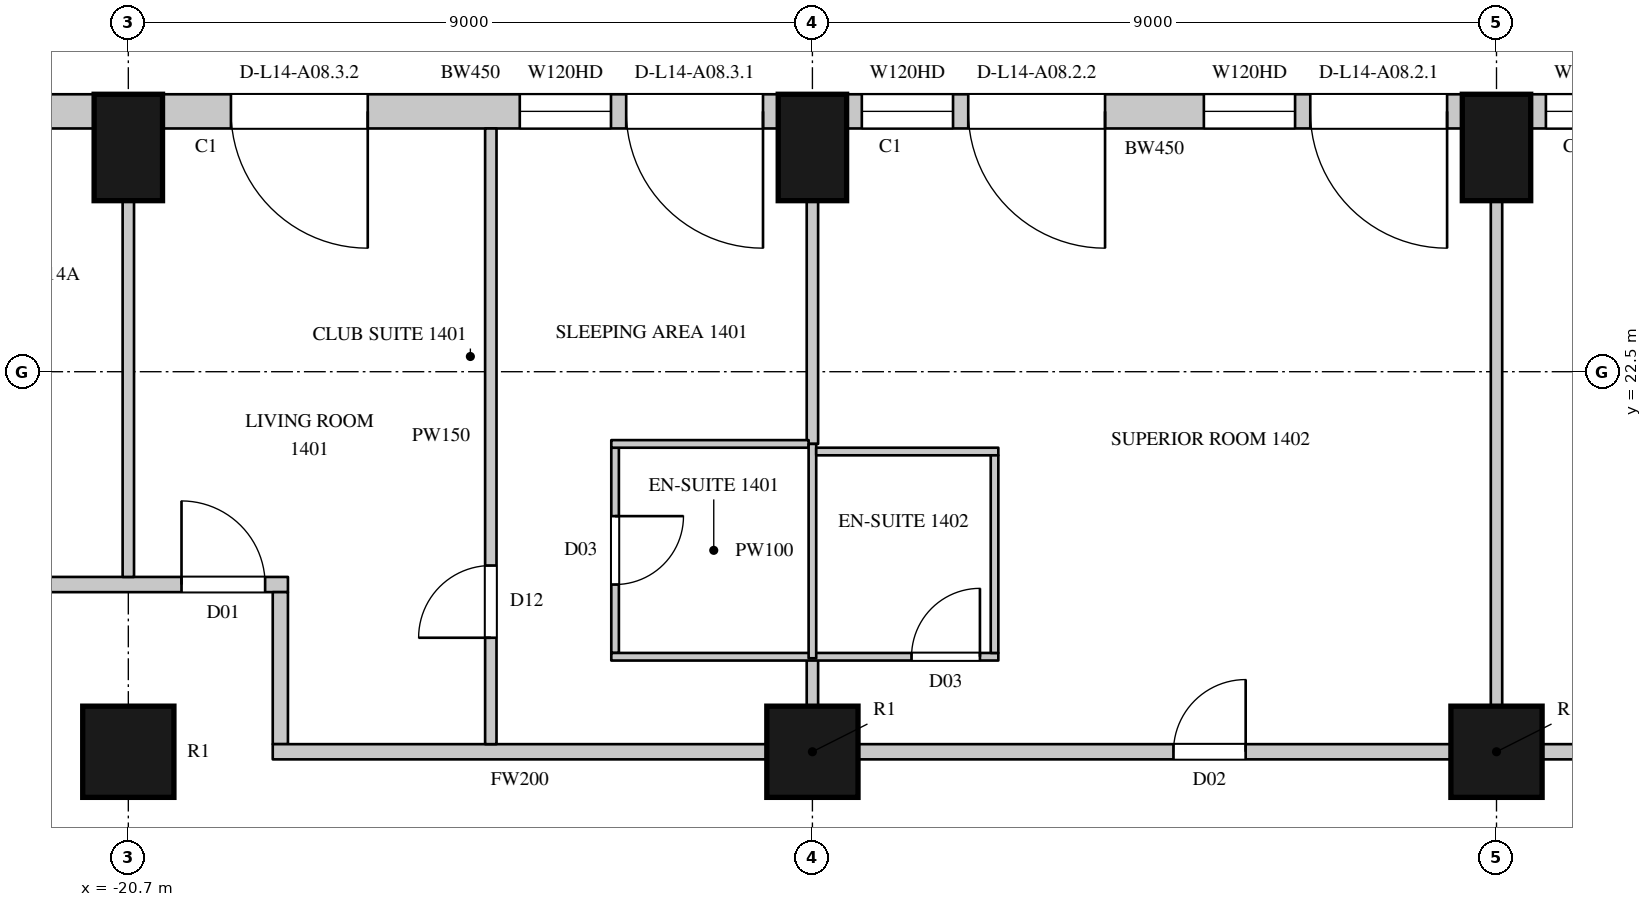
"""IFC4 building model, lengths in metres.
Left out: names, types, materials, properties, quantities, classifications, styles, units other than length and angle.
Written with IfcOpenShell. Run it as: python <this file> out.ifc"""

import sys

from ifc_helpers import new_model, si_unit, direction, frame, frame_2d, origin, origin_2d, place, context, subcontext, project, spatial, rectangle, circle, extrude, element, fill, save


model = new_model("IFC4")
c1 = context("Model", 3, precision=1e-05, world=origin(), true_north=direction((0.0, 1.0)))
c2 = subcontext(c1, "Body", "Model", "MODEL_VIEW")
j1 = project(units=[si_unit("LENGTHUNIT", "METRE"), si_unit("PLANEANGLEUNIT", "RADIAN")], contexts=[c1])
p1 = place(None, origin())
s1 = spatial("IfcSite", under=j1, at=p1, CompositionType="ELEMENT")
p2 = place(p1, origin())
s2 = spatial("IfcBuilding", under=s1, at=p2, CompositionType="ELEMENT")
p3 = place(p2, frame((0.0, 0.0, 80.7)))
s3 = spatial("IfcBuildingStorey", under=s2, at=p3, CompositionType="ELEMENT", Elevation=80.7)
for number, where, z_axis, x_axis in (
    (1, (-2.7, 25.45, 0.0), (0.0, 0.0, 1.0), (-1.0, 0.0, 0.0)),
    (2, (-11.7, 25.45, 0.0), (0.0, 0.0, 1.0), (-1.0, 0.0, 0.0)),
    (3, (-20.7, 25.45, 0.0), (0.0, 0.0, 1.0), (-1.0, 0.0, 0.0)),
):
    element("IfcColumn", number, at=place(p3, frame(where, z_axis=z_axis, x_axis=x_axis)), inside=s3, PredefinedType="COLUMN", context=c2, shape_type="SweptSolid", body=[
        extrude(rectangle(XDim=0.9, YDim=1.4, at=origin_2d()), origin(), (0.0, 0.0, 1.0), 3.6),
    ])
for number, where, z_axis, x_axis in (
    (4, (-20.7, 17.5, 0.0), (0.0, 0.0, 1.0), (1.0, 0.0, 0.0)),
    (5, (-11.7, 17.5, 0.0), (0.0, 0.0, 1.0), (1.0, 0.0, 0.0)),
    (6, (-2.7, 17.5, 0.0), (0.0, 0.0, 1.0), (1.0, 0.0, 0.0)),
):
    element("IfcColumn", number, at=place(p3, frame(where, z_axis=z_axis, x_axis=x_axis)), inside=s3, PredefinedType="COLUMN", context=c2, shape_type="SweptSolid", body=[
        extrude(circle(Radius=0.6, at=origin_2d()), origin(), (0.0, 0.0, 1.0), 3.6),
    ])
p4 = place(p3, frame((5.85, 25.925, 0.0), z_axis=(0.0, 0.0, 1.0), x_axis=(-1.0, 0.0, 0.0)))
e7 = element("IfcWall", 7, at=p4, inside=s3, PredefinedType="SOLIDWALL", context=c2, shape_type="SweptSolid", body=[
    extrude(rectangle(XDim=8.1, YDim=0.45, at=frame_2d((4.05, 0.0))), origin(), (0.0, 0.0, 1.0), 3.3),
])
p5 = place(p4, frame((0.2, 0.0, 0.0)))
e8 = element("IfcOpeningElement", 8, at=p5, cuts=e7, PredefinedType="OPENING", context=c2, shape_type="SweptSolid", body=[
    extrude(rectangle(XDim=1.8, YDim=2.4, at=frame_2d((0.9, 1.2))), frame((0.0, 0.235, 0.0), z_axis=(0.0, -1.0, 0.0), x_axis=(1.0, 0.0, 0.0)), (0.0, 0.0, 1.0), 0.47),
])
p6 = place(p4, frame((2.2, 0.0, 1.05)))
e9 = element("IfcOpeningElement", 9, at=p6, cuts=e7, PredefinedType="OPENING", context=c2, shape_type="SweptSolid", body=[
    extrude(rectangle(XDim=1.2, YDim=2.0, at=frame_2d((0.6, 1.0))), frame((0.0, 0.235, 0.0), z_axis=(0.0, -1.0, 0.0), x_axis=(1.0, 0.0, 0.0)), (0.0, 0.0, 1.0), 0.47),
])
p7 = place(p4, frame((4.7, 0.0, 0.0)))
e10 = element("IfcOpeningElement", 10, at=p7, cuts=e7, PredefinedType="OPENING", context=c2, shape_type="SweptSolid", body=[
    extrude(rectangle(XDim=1.8, YDim=2.4, at=frame_2d((0.9, 1.2))), frame((0.0, 0.235, 0.0), z_axis=(0.0, -1.0, 0.0), x_axis=(1.0, 0.0, 0.0)), (0.0, 0.0, 1.0), 0.47),
])
p8 = place(p4, frame((6.7, 0.0, 1.05)))
e11 = element("IfcOpeningElement", 11, at=p8, cuts=e7, PredefinedType="OPENING", context=c2, shape_type="SweptSolid", body=[
    extrude(rectangle(XDim=1.2, YDim=2.0, at=frame_2d((0.6, 1.0))), frame((0.0, 0.235, 0.0), z_axis=(0.0, -1.0, 0.0), x_axis=(1.0, 0.0, 0.0)), (0.0, 0.0, 1.0), 0.47),
])
p9 = place(p3, frame((-3.15, 25.925, 0.0), z_axis=(0.0, 0.0, 1.0), x_axis=(-1.0, 0.0, 0.0)))
e12 = element("IfcWall", 12, at=p9, inside=s3, PredefinedType="SOLIDWALL", context=c2, shape_type="SweptSolid", body=[
    extrude(rectangle(XDim=8.1, YDim=0.45, at=frame_2d((4.05, 0.0))), origin(), (0.0, 0.0, 1.0), 3.3),
])
p10 = place(p9, frame((0.2, 0.0, 0.0)))
e13 = element("IfcOpeningElement", 13, at=p10, cuts=e12, PredefinedType="OPENING", context=c2, shape_type="SweptSolid", body=[
    extrude(rectangle(XDim=1.8, YDim=2.4, at=frame_2d((0.9, 1.2))), frame((0.0, 0.235, 0.0), z_axis=(0.0, -1.0, 0.0), x_axis=(1.0, 0.0, 0.0)), (0.0, 0.0, 1.0), 0.47),
])
p11 = place(p9, frame((2.2, 0.0, 1.05)))
e14 = element("IfcOpeningElement", 14, at=p11, cuts=e12, PredefinedType="OPENING", context=c2, shape_type="SweptSolid", body=[
    extrude(rectangle(XDim=1.2, YDim=2.0, at=frame_2d((0.6, 1.0))), frame((0.0, 0.235, 0.0), z_axis=(0.0, -1.0, 0.0), x_axis=(1.0, 0.0, 0.0)), (0.0, 0.0, 1.0), 0.47),
])
p12 = place(p9, frame((4.7, 0.0, 0.0)))
e15 = element("IfcOpeningElement", 15, at=p12, cuts=e12, PredefinedType="OPENING", context=c2, shape_type="SweptSolid", body=[
    extrude(rectangle(XDim=1.8, YDim=2.4, at=frame_2d((0.9, 1.2))), frame((0.0, 0.235, 0.0), z_axis=(0.0, -1.0, 0.0), x_axis=(1.0, 0.0, 0.0)), (0.0, 0.0, 1.0), 0.47),
])
p13 = place(p9, frame((6.7, 0.0, 1.05)))
e16 = element("IfcOpeningElement", 16, at=p13, cuts=e12, PredefinedType="OPENING", context=c2, shape_type="SweptSolid", body=[
    extrude(rectangle(XDim=1.2, YDim=2.0, at=frame_2d((0.6, 1.0))), frame((0.0, 0.235, 0.0), z_axis=(0.0, -1.0, 0.0), x_axis=(1.0, 0.0, 0.0)), (0.0, 0.0, 1.0), 0.47),
])
p14 = place(p3, frame((-12.15, 25.925, 0.0), z_axis=(0.0, 0.0, 1.0), x_axis=(-1.0, 0.0, 0.0)))
e17 = element("IfcWall", 17, at=p14, inside=s3, PredefinedType="SOLIDWALL", context=c2, shape_type="SweptSolid", body=[
    extrude(rectangle(XDim=8.1, YDim=0.45, at=frame_2d((4.05, 0.0))), origin(), (0.0, 0.0, 1.0), 3.3),
])
p15 = place(p14, frame((0.2, 0.0, 0.0)))
e18 = element("IfcOpeningElement", 18, at=p15, cuts=e17, PredefinedType="OPENING", context=c2, shape_type="SweptSolid", body=[
    extrude(rectangle(XDim=1.8, YDim=2.4, at=frame_2d((0.9, 1.2))), frame((0.0, 0.235, 0.0), z_axis=(0.0, -1.0, 0.0), x_axis=(1.0, 0.0, 0.0)), (0.0, 0.0, 1.0), 0.47),
])
p16 = place(p14, frame((2.2, 0.0, 1.05)))
e19 = element("IfcOpeningElement", 19, at=p16, cuts=e17, PredefinedType="OPENING", context=c2, shape_type="SweptSolid", body=[
    extrude(rectangle(XDim=1.2, YDim=2.0, at=frame_2d((0.6, 1.0))), frame((0.0, 0.235, 0.0), z_axis=(0.0, -1.0, 0.0), x_axis=(1.0, 0.0, 0.0)), (0.0, 0.0, 1.0), 0.47),
])
p17 = place(p14, frame((5.4, 0.0, 0.0)))
e20 = element("IfcOpeningElement", 20, at=p17, cuts=e17, PredefinedType="OPENING", context=c2, shape_type="SweptSolid", body=[
    extrude(rectangle(XDim=1.8, YDim=2.4, at=frame_2d((0.9, 1.2))), frame((0.0, 0.235, 0.0), z_axis=(0.0, -1.0, 0.0), x_axis=(1.0, 0.0, 0.0)), (0.0, 0.0, 1.0), 0.47),
])
p18 = place(p3, frame((-21.15, 25.925, 0.0), z_axis=(0.0, 0.0, 1.0), x_axis=(-1.0, 0.0, 0.0)))
e21 = element("IfcWall", 21, at=p18, inside=s3, PredefinedType="SOLIDWALL", context=c2, shape_type="SweptSolid", body=[
    extrude(rectangle(XDim=2.914, YDim=0.45, at=frame_2d((1.457, 0.0))), origin(), (0.0, 0.0, 1.0), 3.3),
])
p19 = place(p3, frame((-23.7, 19.7, 0.0), z_axis=(0.0, 0.0, 1.0), x_axis=(1.0, 0.0, 0.0)))
e22 = element("IfcWall", 22, at=p19, inside=s3, PredefinedType="PARTITIONING", context=c2, shape_type="SweptSolid", body=[
    extrude(rectangle(XDim=5.1, YDim=0.2, at=frame_2d((2.55, 0.0))), origin(), (0.0, 0.0, 1.0), 3.3),
])
p20 = place(p19, frame((0.8, 0.0, 0.0)))
e23 = element("IfcOpeningElement", 23, at=p20, cuts=e22, PredefinedType="OPENING", context=c2, shape_type="SweptSolid", body=[
    extrude(rectangle(XDim=0.9, YDim=2.2, at=frame_2d((0.45, 1.1))), frame((0.0, 0.11, 0.0), z_axis=(0.0, -1.0, 0.0), x_axis=(1.0, 0.0, 0.0)), (0.0, 0.0, 1.0), 0.22),
])
p21 = place(p19, frame((3.7, 0.0, 0.0)))
e24 = element("IfcOpeningElement", 24, at=p21, cuts=e22, PredefinedType="OPENING", context=c2, shape_type="SweptSolid", body=[
    extrude(rectangle(XDim=1.1, YDim=2.4, at=frame_2d((0.55, 1.2))), frame((0.0, 0.11, 0.0), z_axis=(0.0, -1.0, 0.0), x_axis=(1.0, 0.0, 0.0)), (0.0, 0.0, 1.0), 0.22),
])
p22 = place(p3, frame((-18.7, 17.6, 0.0), z_axis=(0.0, 0.0, 1.0), x_axis=(0.0, 1.0, 0.0)))
e25 = element("IfcWall", 25, at=p22, inside=s3, PredefinedType="PARTITIONING", context=c2, shape_type="SweptSolid", body=[
    extrude(rectangle(XDim=2.0, YDim=0.2, at=frame_2d((1.0, 0.0))), origin(), (0.0, 0.0, 1.0), 3.3),
])
p23 = place(p3, frame((-18.8, 17.5, 0.0), z_axis=(0.0, 0.0, 1.0), x_axis=(1.0, 0.0, 0.0)))
e26 = element("IfcWall", 26, at=p23, inside=s3, PredefinedType="PARTITIONING", context=c2, shape_type="SweptSolid", body=[
    extrude(rectangle(XDim=6.5, YDim=0.2, at=frame_2d((3.25, 0.0))), origin(), (0.0, 0.0, 1.0), 2.75),
])
p24 = place(p3, frame((-11.1, 17.5, 0.0), z_axis=(0.0, 0.0, 1.0), x_axis=(1.0, 0.0, 0.0)))
e27 = element("IfcWall", 27, at=p24, inside=s3, PredefinedType="PARTITIONING", context=c2, shape_type="SweptSolid", body=[
    extrude(rectangle(XDim=7.8, YDim=0.2, at=frame_2d((3.9, 0.0))), origin(), (0.0, 0.0, 1.0), 2.75),
])
p25 = place(p24, frame((4.15, 0.0, 0.0)))
e28 = element("IfcOpeningElement", 28, at=p25, cuts=e27, PredefinedType="OPENING", context=c2, shape_type="SweptSolid", body=[
    extrude(rectangle(XDim=0.95, YDim=2.2, at=frame_2d((0.475, 1.1))), frame((0.0, 0.11, 0.0), z_axis=(0.0, -1.0, 0.0), x_axis=(1.0, 0.0, 0.0)), (0.0, 0.0, 1.0), 0.22),
])
p26 = place(p3, frame((-2.1, 17.5, 0.0), z_axis=(0.0, 0.0, 1.0), x_axis=(1.0, 0.0, 0.0)))
e29 = element("IfcWall", 29, at=p26, inside=s3, PredefinedType="PARTITIONING", context=c2, shape_type="SweptSolid", body=[
    extrude(rectangle(XDim=7.8, YDim=0.2, at=frame_2d((3.9, 0.0))), origin(), (0.0, 0.0, 1.0), 2.75),
])
p27 = place(p26, frame((1.55, 0.0, 0.0)))
e30 = element("IfcOpeningElement", 30, at=p27, cuts=e29, PredefinedType="OPENING", context=c2, shape_type="SweptSolid", body=[
    extrude(rectangle(XDim=1.1, YDim=2.4, at=frame_2d((0.55, 1.2))), frame((0.0, 0.11, 0.0), z_axis=(0.0, -1.0, 0.0), x_axis=(1.0, 0.0, 0.0)), (0.0, 0.0, 1.0), 0.22),
])
p28 = place(p3, frame((-20.7, 19.8, 0.0), z_axis=(0.0, 0.0, 1.0), x_axis=(0.0, 1.0, 0.0)))
e31 = element("IfcWall", 31, at=p28, inside=s3, PredefinedType="PARTITIONING", context=c2, shape_type="SweptSolid", body=[
    extrude(rectangle(XDim=4.95, YDim=0.15, at=frame_2d((2.475, 0.0))), origin(), (0.0, 0.0, 1.0), 2.75),
])
p29 = place(p3, frame((-15.931, 17.6, 0.0), z_axis=(0.0, 0.0, 1.0), x_axis=(0.0, 1.0, 0.0)))
e32 = element("IfcWall", 32, at=p29, inside=s3, PredefinedType="PARTITIONING", context=c2, shape_type="SweptSolid", body=[
    extrude(rectangle(XDim=8.1, YDim=0.15, at=frame_2d((4.05, 0.0))), origin(), (0.0, 0.0, 1.0), 3.3),
])
p30 = place(p29, frame((1.4, 0.0, 0.0)))
e33 = element("IfcOpeningElement", 33, at=p30, cuts=e32, PredefinedType="OPENING", context=c2, shape_type="SweptSolid", body=[
    extrude(rectangle(XDim=0.95, YDim=2.2, at=frame_2d((0.475, 1.1))), frame((0.0, 0.085, 0.0), z_axis=(0.0, -1.0, 0.0), x_axis=(1.0, 0.0, 0.0)), (0.0, 0.0, 1.0), 0.17),
])
p31 = place(p3, frame((-11.7, 18.1, 0.0), z_axis=(0.0, 0.0, 1.0), x_axis=(0.0, 1.0, 0.0)))
e34 = element("IfcWall", 34, at=p31, inside=s3, PredefinedType="PARTITIONING", context=c2, shape_type="SweptSolid", body=[
    extrude(rectangle(XDim=0.63, YDim=0.15, at=frame_2d((0.315, 0.0))), origin(), (0.0, 0.0, 1.0), 2.75),
])
p32 = place(p3, frame((-11.7, 21.55, 0.0), z_axis=(0.0, 0.0, 1.0), x_axis=(0.0, 1.0, 0.0)))
e35 = element("IfcWall", 35, at=p32, inside=s3, PredefinedType="PARTITIONING", context=c2, shape_type="SweptSolid", body=[
    extrude(rectangle(XDim=3.2, YDim=0.15, at=frame_2d((1.6, 0.0))), origin(), (0.0, 0.0, 1.0), 2.75),
])
p33 = place(p3, frame((-2.7, 18.1, 0.0), z_axis=(0.0, 0.0, 1.0), x_axis=(0.0, 1.0, 0.0)))
e36 = element("IfcWall", 36, at=p33, inside=s3, PredefinedType="PARTITIONING", context=c2, shape_type="SweptSolid", body=[
    extrude(rectangle(XDim=6.65, YDim=0.15, at=frame_2d((3.325, 0.0))), origin(), (0.0, 0.0, 1.0), 2.75),
])
p34 = place(p3, frame((-14.296, 18.8, 0.0), z_axis=(0.0, 0.0, 1.0), x_axis=(0.0, 1.0, 0.0)))
e37 = element("IfcWall", 37, at=p34, inside=s3, PredefinedType="PARTITIONING", context=c2, shape_type="SweptSolid", body=[
    extrude(rectangle(XDim=2.7, YDim=0.1, at=frame_2d((1.35, 0.0))), origin(), (0.0, 0.0, 1.0), 3.3),
])
p35 = place(p34, frame((0.9, 0.0, 0.0)))
e38 = element("IfcOpeningElement", 38, at=p35, cuts=e37, PredefinedType="OPENING", context=c2, shape_type="SweptSolid", body=[
    extrude(rectangle(XDim=0.9, YDim=2.2, at=frame_2d((0.45, 1.1))), frame((0.0, 0.06, 0.0), z_axis=(0.0, -1.0, 0.0), x_axis=(1.0, 0.0, 0.0)), (0.0, 0.0, 1.0), 0.12),
])
p36 = place(p3, frame((-14.346, 18.75, 0.0), z_axis=(0.0, 0.0, 1.0), x_axis=(1.0, 0.0, 0.0)))
e39 = element("IfcWall", 39, at=p36, inside=s3, PredefinedType="PARTITIONING", context=c2, shape_type="SweptSolid", body=[
    extrude(rectangle(XDim=5.092, YDim=0.1, at=frame_2d((2.546, 0.0))), origin(), (0.0, 0.0, 1.0), 3.3),
])
p37 = place(p36, frame((3.95, 0.0, 0.0)))
e40 = element("IfcOpeningElement", 40, at=p37, cuts=e39, PredefinedType="OPENING", context=c2, shape_type="SweptSolid", body=[
    extrude(rectangle(XDim=0.9, YDim=2.2, at=frame_2d((0.45, 1.1))), frame((0.0, 0.06, 0.0), z_axis=(0.0, -1.0, 0.0), x_axis=(1.0, 0.0, 0.0)), (0.0, 0.0, 1.0), 0.12),
])
p38 = place(p3, frame((-14.346, 21.55, 0.0), z_axis=(0.0, 0.0, 1.0), x_axis=(1.0, 0.0, 0.0)))
e41 = element("IfcWall", 41, at=p38, inside=s3, PredefinedType="PARTITIONING", context=c2, shape_type="SweptSolid", body=[
    extrude(rectangle(XDim=2.596, YDim=0.1, at=frame_2d((1.298, 0.0))), origin(), (0.0, 0.0, 1.0), 3.3),
])
p39 = place(p3, frame((-11.7, 18.73, 0.0), z_axis=(0.0, 0.0, 1.0), x_axis=(0.0, 1.0, 0.0)))
e42 = element("IfcWall", 42, at=p39, inside=s3, PredefinedType="PARTITIONING", context=c2, shape_type="SweptSolid", body=[
    extrude(rectangle(XDim=2.82, YDim=0.1, at=frame_2d((1.41, 0.0))), origin(), (0.0, 0.0, 1.0), 2.75),
])
p40 = place(p3, frame((-11.65, 21.45, 0.0), z_axis=(0.0, 0.0, 1.0), x_axis=(1.0, 0.0, 0.0)))
e43 = element("IfcWall", 43, at=p40, inside=s3, PredefinedType="PARTITIONING", context=c2, shape_type="SweptSolid", body=[
    extrude(rectangle(XDim=2.396, YDim=0.1, at=frame_2d((1.198, 0.0))), origin(), (0.0, 0.0, 1.0), 3.3),
])
p41 = place(p3, frame((-9.304, 18.8, 0.0), z_axis=(0.0, 0.0, 1.0), x_axis=(0.0, 1.0, 0.0)))
e44 = element("IfcWall", 44, at=p41, inside=s3, PredefinedType="PARTITIONING", context=c2, shape_type="SweptSolid", body=[
    extrude(rectangle(XDim=2.6, YDim=0.1, at=frame_2d((1.3, 0.0))), origin(), (0.0, 0.0, 1.0), 3.3),
])
p42 = place(p8, origin())
e45 = element("IfcWindow", 45, at=p42, inside=s3, PartitioningType="SINGLE_PANEL", PredefinedType="WINDOW", context=c2, shape_type="SweptSolid", body=[
    extrude(rectangle(XDim=1.2, YDim=2.0, at=frame_2d((0.6, 1.0))), frame((0.0, 0.135, 0.0), z_axis=(0.0, -1.0, 0.0), x_axis=(1.0, 0.0, 0.0)), (0.0, 0.0, 1.0), 0.06),
])
fill(e11, e45)
p43 = place(p10, origin())
e46 = element("IfcDoor", 46, at=p43, inside=s3, OperationType="SLIDING_TO_LEFT", PredefinedType="DOOR", context=c2, shape_type="SweptSolid", body=[
    extrude(rectangle(XDim=1.8, YDim=2.4, at=frame_2d((0.9, 1.2))), frame((0.0, 0.13, 0.0), z_axis=(0.0, -1.0, 0.0), x_axis=(1.0, 0.0, 0.0)), (0.0, 0.0, 1.0), 0.05),
])
fill(e13, e46)
p44 = place(p11, origin())
e47 = element("IfcWindow", 47, at=p44, inside=s3, PartitioningType="SINGLE_PANEL", PredefinedType="WINDOW", context=c2, shape_type="SweptSolid", body=[
    extrude(rectangle(XDim=1.2, YDim=2.0, at=frame_2d((0.6, 1.0))), frame((0.0, 0.135, 0.0), z_axis=(0.0, -1.0, 0.0), x_axis=(1.0, 0.0, 0.0)), (0.0, 0.0, 1.0), 0.06),
])
fill(e14, e47)
p45 = place(p12, origin())
e48 = element("IfcDoor", 48, at=p45, inside=s3, OperationType="SLIDING_TO_LEFT", PredefinedType="DOOR", context=c2, shape_type="SweptSolid", body=[
    extrude(rectangle(XDim=1.8, YDim=2.4, at=frame_2d((0.9, 1.2))), frame((0.0, 0.13, 0.0), z_axis=(0.0, -1.0, 0.0), x_axis=(1.0, 0.0, 0.0)), (0.0, 0.0, 1.0), 0.05),
])
fill(e15, e48)
p46 = place(p13, origin())
e49 = element("IfcWindow", 49, at=p46, inside=s3, PartitioningType="SINGLE_PANEL", PredefinedType="WINDOW", context=c2, shape_type="SweptSolid", body=[
    extrude(rectangle(XDim=1.2, YDim=2.0, at=frame_2d((0.6, 1.0))), frame((0.0, 0.135, 0.0), z_axis=(0.0, -1.0, 0.0), x_axis=(1.0, 0.0, 0.0)), (0.0, 0.0, 1.0), 0.06),
])
fill(e16, e49)
p47 = place(p15, origin())
e50 = element("IfcDoor", 50, at=p47, inside=s3, OperationType="SLIDING_TO_LEFT", PredefinedType="DOOR", context=c2, shape_type="SweptSolid", body=[
    extrude(rectangle(XDim=1.8, YDim=2.4, at=frame_2d((0.9, 1.2))), frame((0.0, 0.13, 0.0), z_axis=(0.0, -1.0, 0.0), x_axis=(1.0, 0.0, 0.0)), (0.0, 0.0, 1.0), 0.05),
])
fill(e18, e50)
p48 = place(p16, origin())
e51 = element("IfcWindow", 51, at=p48, inside=s3, PartitioningType="SINGLE_PANEL", PredefinedType="WINDOW", context=c2, shape_type="SweptSolid", body=[
    extrude(rectangle(XDim=1.2, YDim=2.0, at=frame_2d((0.6, 1.0))), frame((0.0, 0.135, 0.0), z_axis=(0.0, -1.0, 0.0), x_axis=(1.0, 0.0, 0.0)), (0.0, 0.0, 1.0), 0.06),
])
fill(e19, e51)
p49 = place(p17, origin())
e52 = element("IfcDoor", 52, at=p49, inside=s3, OperationType="SLIDING_TO_LEFT", PredefinedType="DOOR", context=c2, shape_type="SweptSolid", body=[
    extrude(rectangle(XDim=1.8, YDim=2.4, at=frame_2d((0.9, 1.2))), frame((0.0, 0.13, 0.0), z_axis=(0.0, -1.0, 0.0), x_axis=(1.0, 0.0, 0.0)), (0.0, 0.0, 1.0), 0.05),
])
fill(e20, e52)
p50 = place(p21, origin())
e53 = element("IfcDoor", 53, at=p50, inside=s3, OperationType="SINGLE_SWING_LEFT", PredefinedType="DOOR", context=c2, shape_type="SweptSolid", body=[
    extrude(rectangle(XDim=1.1, YDim=2.4, at=frame_2d((0.55, 1.2))), frame((0.0, 0.025, 0.0), z_axis=(0.0, -1.0, 0.0), x_axis=(1.0, 0.0, 0.0)), (0.0, 0.0, 1.0), 0.05),
])
fill(e24, e53)
p51 = place(p30, origin())
e54 = element("IfcDoor", 54, at=p51, inside=s3, OperationType="SINGLE_SWING_LEFT", PredefinedType="DOOR", context=c2, shape_type="SweptSolid", body=[
    extrude(rectangle(XDim=0.95, YDim=2.2, at=frame_2d((0.475, 1.1))), frame((0.0, 0.025, 0.0), z_axis=(0.0, -1.0, 0.0), x_axis=(1.0, 0.0, 0.0)), (0.0, 0.0, 1.0), 0.05),
])
fill(e33, e54)
p52 = place(p35, origin())
e55 = element("IfcDoor", 55, at=p52, inside=s3, OperationType="SINGLE_SWING_LEFT", PredefinedType="DOOR", context=c2, shape_type="SweptSolid", body=[
    extrude(rectangle(XDim=0.9, YDim=2.2, at=frame_2d((0.45, 1.1))), frame((0.0, 0.025, 0.0), z_axis=(0.0, -1.0, 0.0), x_axis=(1.0, 0.0, 0.0)), (0.0, 0.0, 1.0), 0.05),
])
fill(e38, e55)
p53 = place(p25, origin())
e56 = element("IfcDoor", 56, at=p53, inside=s3, OperationType="SINGLE_SWING_RIGHT", PredefinedType="DOOR", context=c2, shape_type="SweptSolid", body=[
    extrude(rectangle(XDim=0.95, YDim=2.2, at=frame_2d((0.475, 1.1))), frame((0.0, 0.025, 0.0), z_axis=(0.0, -1.0, 0.0), x_axis=(1.0, 0.0, 0.0)), (0.0, 0.0, 1.0), 0.05),
])
fill(e28, e56)
p54 = place(p37, origin())
e57 = element("IfcDoor", 57, at=p54, inside=s3, OperationType="SINGLE_SWING_RIGHT", PredefinedType="DOOR", context=c2, shape_type="SweptSolid", body=[
    extrude(rectangle(XDim=0.9, YDim=2.2, at=frame_2d((0.45, 1.1))), frame((0.0, 0.025, 0.0), z_axis=(0.0, -1.0, 0.0), x_axis=(1.0, 0.0, 0.0)), (0.0, 0.0, 1.0), 0.05),
])
fill(e40, e57)
save(model, sys.argv[1])
